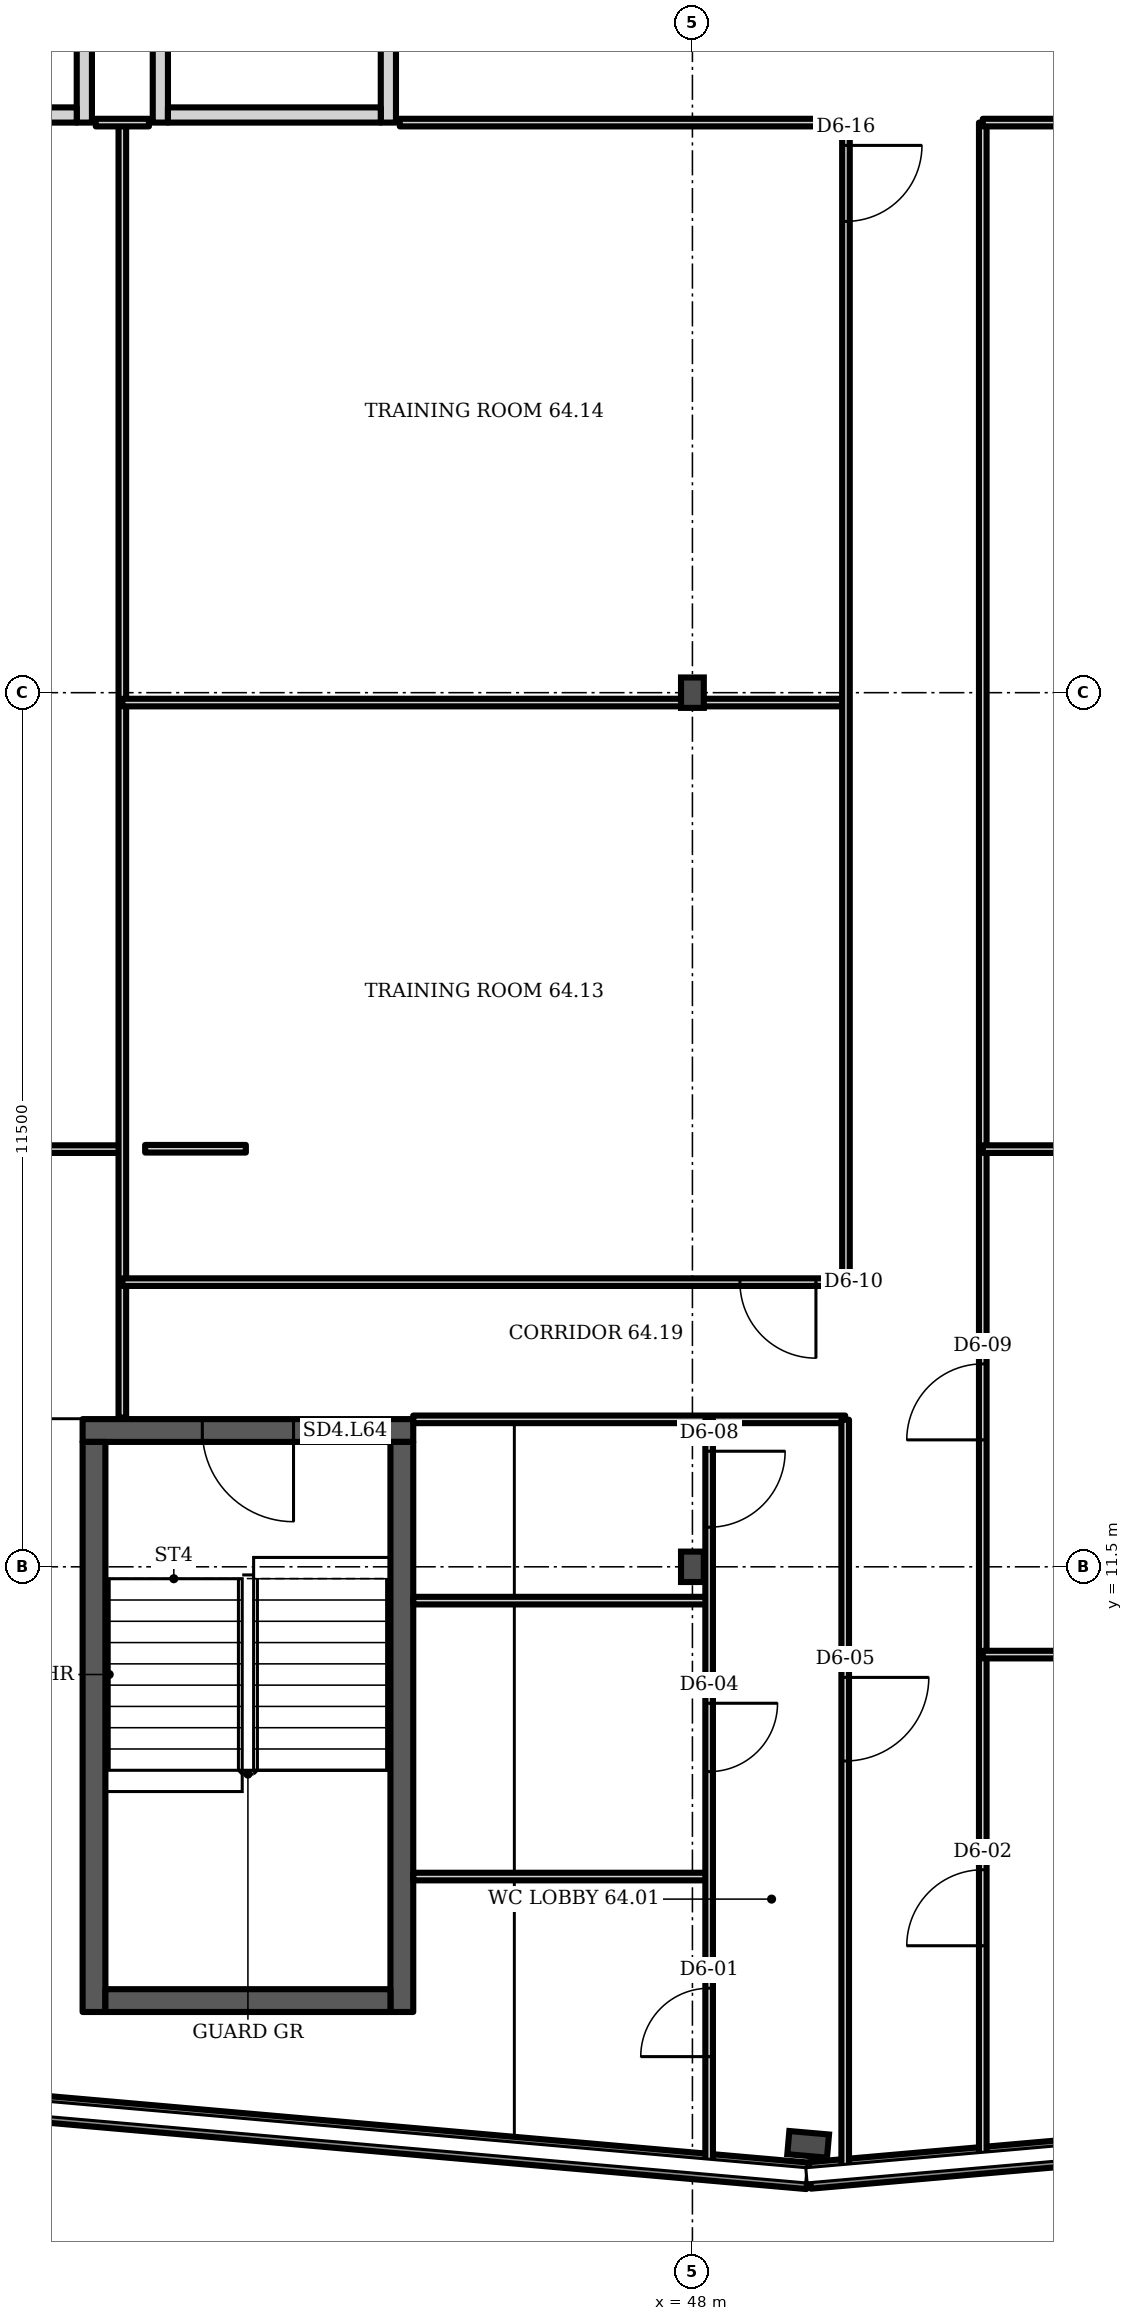
"""IFC4 building model, lengths in metres.
Left out: names, types, materials, properties, quantities, classifications, styles, units other than length and angle.
Written with IfcOpenShell. Run it as: python <this file> out.ifc"""

import sys

from ifc_helpers import new_model, si_unit, direction, frame, frame_2d, origin, origin_2d, place, context, subcontext, project, spatial, rectangle, i_section, extrude, element, fill, save


model = new_model("IFC4")
c1 = context("Model", 3, precision=1e-05, world=origin(), true_north=direction((0.0, 1.0)))
c2 = subcontext(c1, "Body", "Model", "MODEL_VIEW")
j1 = project(units=[si_unit("LENGTHUNIT", "METRE"), si_unit("PLANEANGLEUNIT", "RADIAN")], contexts=[c1])
p1 = place(None, origin())
s1 = spatial("IfcSite", under=j1, at=p1, CompositionType="ELEMENT")
p2 = place(p1, origin())
s2 = spatial("IfcBuilding", under=s1, at=p2, CompositionType="ELEMENT")
p3 = place(p2, frame((0.0, 0.0, 253.9)))
s3 = spatial("IfcBuildingStorey", under=s2, at=p3, CompositionType="ELEMENT", Elevation=253.9)
p4 = place(p3, frame((49.523, 3.902, 0.0), z_axis=(0.0, 0.0, 1.0), x_axis=(-0.087156, -0.996197, 0.0)))
e1 = element("IfcColumn", 1, at=p4, inside=s3, PredefinedType="COLUMN", context=c2, shape_type="SweptSolid", body=[
    extrude(i_section(OverallWidth=0.306, OverallDepth=0.524, WebThickness=0.021, FlangeThickness=0.04, FilletRadius=0.027, at=origin_2d()), origin(), (0.0, 0.0, 1.0), 3.6),
])
for number, where, z_axis, x_axis in (
    (2, (48.0, 11.5, 0.0), (0.0, 0.0, 1.0), (1.0, 0.0, 0.0)),
    (3, (48.0, 23.0, 0.0), (0.0, 0.0, 1.0), (1.0, 0.0, 0.0)),
):
    element("IfcColumn", number, at=place(p3, frame(where, z_axis=z_axis, x_axis=x_axis)), inside=s3, PredefinedType="COLUMN", context=c2, shape_type="SweptSolid", body=[
        extrude(i_section(OverallWidth=0.3, OverallDepth=0.4, WebThickness=0.013, FlangeThickness=0.024, FilletRadius=0.027, at=origin_2d()), origin(), (0.0, 0.0, 1.0), 3.6),
    ])
p5 = place(p3, frame((37.729, 4.519, 0.0), z_axis=(0.0, 0.0, 1.0), x_axis=(0.99619, -0.087167, 0.0)))
e4 = element("IfcWall", 4, at=p5, inside=s3, PredefinedType="SOLIDWALL", context=c2, shape_type="SweptSolid", body=[
    extrude(rectangle(XDim=11.831, YDim=0.35, at=frame_2d((5.915, 0.0))), origin(), (0.0, 0.0, 1.0), 1.0),
])
p6 = place(p3, frame((49.545, 3.493, 0.0), z_axis=(0.0, 0.0, 1.0), x_axis=(0.996196, 0.087141, 0.0)))
e5 = element("IfcWall", 5, at=p6, inside=s3, PredefinedType="SOLIDWALL", context=c2, shape_type="SweptSolid", body=[
    extrude(rectangle(XDim=11.803, YDim=0.35, at=frame_2d((5.902, 0.0))), origin(), (0.0, 0.0, 1.0), 1.0),
])
p7 = place(p3, frame((40.0, 30.5, 0.0), z_axis=(0.0, 0.0, 1.0), x_axis=(0.0, 1.0, 0.0)))
e6 = element("IfcWall", 6, at=p7, inside=s3, PredefinedType="PARTITIONING", context=c2, shape_type="SweptSolid", body=[
    extrude(rectangle(XDim=3.5, YDim=0.2, at=frame_2d((1.75, 0.0))), origin(), (0.0, 0.0, 1.0), 3.2),
])
p8 = place(p3, frame((37.1, 30.6, 0.0), z_axis=(0.0, 0.0, 1.0), x_axis=(1.0, 0.0, 0.0)))
e7 = element("IfcWall", 7, at=p8, inside=s3, PredefinedType="PARTITIONING", context=c2, shape_type="SweptSolid", body=[
    extrude(rectangle(XDim=2.8, YDim=0.2, at=frame_2d((1.4, 0.0))), origin(), (0.0, 0.0, 1.0), 3.2),
])
p9 = place(p3, frame((41.0, 30.5, 0.0), z_axis=(0.0, 0.0, 1.0), x_axis=(0.0, 1.0, 0.0)))
e8 = element("IfcWall", 8, at=p9, inside=s3, PredefinedType="PARTITIONING", context=c2, shape_type="SweptSolid", body=[
    extrude(rectangle(XDim=3.5, YDim=0.2, at=frame_2d((1.75, 0.0))), origin(), (0.0, 0.0, 1.0), 3.2),
])
p10 = place(p3, frame((44.0, 30.5, 0.0), z_axis=(0.0, 0.0, 1.0), x_axis=(0.0, 1.0, 0.0)))
e9 = element("IfcWall", 9, at=p10, inside=s3, PredefinedType="PARTITIONING", context=c2, shape_type="SweptSolid", body=[
    extrude(rectangle(XDim=3.5, YDim=0.2, at=frame_2d((1.75, 0.0))), origin(), (0.0, 0.0, 1.0), 3.2),
])
p11 = place(p10, frame((1.2, 0.0, 0.0)))
e10 = element("IfcOpeningElement", 10, at=p11, cuts=e9, PredefinedType="OPENING", context=c2, shape_type="SweptSolid", body=[
    extrude(rectangle(XDim=1.1, YDim=2.1, at=frame_2d((0.55, 1.05))), frame((0.0, 0.11, 0.0), z_axis=(0.0, -1.0, 0.0), x_axis=(1.0, 0.0, 0.0)), (0.0, 0.0, 1.0), 0.22),
])
p12 = place(p3, frame((41.1, 30.6, 0.0), z_axis=(0.0, 0.0, 1.0), x_axis=(1.0, 0.0, 0.0)))
e11 = element("IfcWall", 11, at=p12, inside=s3, PredefinedType="PARTITIONING", context=c2, shape_type="SweptSolid", body=[
    extrude(rectangle(XDim=2.8, YDim=0.2, at=frame_2d((1.4, 0.0))), origin(), (0.0, 0.0, 1.0), 3.2),
])
p13 = place(p3, frame((39.977, 13.293, 0.0), z_axis=(0.0, 0.0, 1.0), x_axis=(1.0, 0.0, 0.0)))
e12 = element("IfcWall", 12, at=p13, inside=s3, PredefinedType="SHEAR", context=c2, shape_type="SweptSolid", body=[
    extrude(rectangle(XDim=4.35, YDim=0.3, at=frame_2d((2.175, 0.0))), origin(), (0.0, 0.0, 1.0), 3.2),
])
p14 = place(p13, frame((1.575, 0.0, 0.0)))
e13 = element("IfcOpeningElement", 13, at=p14, cuts=e12, PredefinedType="OPENING", context=c2, shape_type="SweptSolid", body=[
    extrude(rectangle(XDim=1.2, YDim=2.1, at=frame_2d((0.6, 1.05))), frame((0.0, 0.16, 0.0), z_axis=(0.0, -1.0, 0.0), x_axis=(1.0, 0.0, 0.0)), (0.0, 0.0, 1.0), 0.32),
])
p15 = place(p3, frame((29.1, 16.995, 0.0), z_axis=(0.0, 0.0, 1.0), x_axis=(1.0, 0.0, 0.0)))
e14 = element("IfcWall", 14, at=p15, inside=s3, PredefinedType="PARTITIONING", context=c2, shape_type="SweptSolid", body=[
    extrude(rectangle(XDim=11.4, YDim=0.1, at=frame_2d((5.7, 0.0))), origin(), (0.0, 0.0, 1.0), 3.2),
])
p16 = place(p3, frame((40.5, 13.463, 0.0), z_axis=(0.0, 0.0, 1.0), x_axis=(0.0, 1.0, 0.0)))
e15 = element("IfcWall", 15, at=p16, inside=s3, PredefinedType="PARTITIONING", context=c2, shape_type="SweptSolid", body=[
    extrude(rectangle(XDim=17.037, YDim=0.1, at=frame_2d((8.519, 0.0))), origin(), (0.0, 0.0, 1.0), 3.2),
])
p17 = place(p3, frame((40.5, 15.245, 0.0), z_axis=(0.0, 0.0, 1.0), x_axis=(1.0, 0.0, 0.0)))
e16 = element("IfcWall", 16, at=p17, inside=s3, PredefinedType="PARTITIONING", context=c2, shape_type="SweptSolid", body=[
    extrude(rectangle(XDim=9.52, YDim=0.1, at=frame_2d((4.76, 0.0))), origin(), (0.0, 0.0, 1.0), 3.2),
])
p18 = place(p17, frame((8.125, 0.0, 0.0)))
e17 = element("IfcOpeningElement", 17, at=p18, cuts=e16, PredefinedType="OPENING", context=c2, shape_type="SweptSolid", body=[
    extrude(rectangle(XDim=1.0, YDim=2.1, at=frame_2d((0.5, 1.05))), frame((0.0, 0.06, 0.0), z_axis=(0.0, -1.0, 0.0), x_axis=(1.0, 0.0, 0.0)), (0.0, 0.0, 1.0), 0.12),
])
p19 = place(p3, frame((40.5, 22.87, 0.0), z_axis=(0.0, 0.0, 1.0), x_axis=(1.0, 0.0, 0.0)))
e18 = element("IfcWall", 18, at=p19, inside=s3, PredefinedType="PARTITIONING", context=c2, shape_type="SweptSolid", body=[
    extrude(rectangle(XDim=9.52, YDim=0.1, at=frame_2d((4.76, 0.0))), origin(), (0.0, 0.0, 1.0), 3.2),
])
p20 = place(p3, frame((40.8, 17.0, 0.0), z_axis=(0.0, 0.0, 1.0), x_axis=(1.0, 0.0, 0.0)))
e19 = element("IfcWall", 19, at=p20, inside=s3, PredefinedType="PARTITIONING", context=c2, shape_type="SweptSolid", body=[
    extrude(rectangle(XDim=1.325, YDim=0.1, at=frame_2d((0.663, 0.0))), origin(), (0.0, 0.0, 1.0), 3.2),
])
for number, where, z_axis, x_axis in (
    (20, (44.327, 7.425, 0.0), (0.0, 0.0, 1.0), (1.0, 0.0, 0.0)),
    (21, (44.327, 11.055, 0.0), (0.0, 0.0, 1.0), (1.0, 0.0, 0.0)),
):
    element("IfcWall", number, at=place(p3, frame(where, z_axis=z_axis, x_axis=x_axis)), inside=s3, PredefinedType="PARTITIONING", context=c2, shape_type="SweptSolid", body=[
        extrude(rectangle(XDim=3.893, YDim=0.1, at=frame_2d((1.946, 0.0))), origin(), (0.0, 0.0, 1.0), 3.2),
    ])
p21 = place(p3, frame((44.327, 13.44, 0.0), z_axis=(0.0, 0.0, 1.0), x_axis=(1.0, 0.0, 0.0)))
e22 = element("IfcWall", 22, at=p21, inside=s3, PredefinedType="PARTITIONING", context=c2, shape_type="SweptSolid", body=[
    extrude(rectangle(XDim=5.683, YDim=0.1, at=frame_2d((2.841, 0.0))), origin(), (0.0, 0.0, 1.0), 3.2),
])
p22 = place(p3, frame((48.22, 3.626, 0.0), z_axis=(0.0, 0.0, 1.0), x_axis=(0.0, 1.0, 0.0)))
e23 = element("IfcWall", 23, at=p22, inside=s3, PredefinedType="PARTITIONING", context=c2, shape_type="SweptSolid", body=[
    extrude(rectangle(XDim=9.809, YDim=0.1, at=frame_2d((4.904, 0.0))), origin(), (0.0, 0.0, 1.0), 2.58),
])
p23 = place(p22, frame((1.43, 0.0, 0.0)))
e24 = element("IfcOpeningElement", 24, at=p23, cuts=e23, PredefinedType="OPENING", context=c2, shape_type="SweptSolid", body=[
    extrude(rectangle(XDim=0.9, YDim=2.1, at=frame_2d((0.45, 1.05))), frame((0.0, 0.06, 0.0), z_axis=(0.0, -1.0, 0.0), x_axis=(1.0, 0.0, 0.0)), (0.0, 0.0, 1.0), 0.12),
])
p24 = place(p22, frame((5.179, 0.0, 0.0)))
e25 = element("IfcOpeningElement", 25, at=p24, cuts=e23, PredefinedType="OPENING", context=c2, shape_type="SweptSolid", body=[
    extrude(rectangle(XDim=0.9, YDim=2.1, at=frame_2d((0.45, 1.05))), frame((0.0, 0.06, 0.0), z_axis=(0.0, -1.0, 0.0), x_axis=(1.0, 0.0, 0.0)), (0.0, 0.0, 1.0), 0.12),
])
p25 = place(p22, frame((8.395, 0.0, 0.0)))
e26 = element("IfcOpeningElement", 26, at=p25, cuts=e23, PredefinedType="OPENING", context=c2, shape_type="SweptSolid", body=[
    extrude(rectangle(XDim=1.0, YDim=2.1, at=frame_2d((0.5, 1.05))), frame((0.0, 0.06, 0.0), z_axis=(0.0, -1.0, 0.0), x_axis=(1.0, 0.0, 0.0)), (0.0, 0.0, 1.0), 0.12),
])
p26 = place(p3, frame((50.01, 3.559, 0.0), z_axis=(0.0, 0.0, 1.0), x_axis=(0.0, 1.0, 0.0)))
e27 = element("IfcWall", 27, at=p26, inside=s3, PredefinedType="PARTITIONING", context=c2, shape_type="SweptSolid", body=[
    extrude(rectangle(XDim=9.876, YDim=0.1, at=frame_2d((4.938, 0.0))), origin(), (0.0, 0.0, 1.0), 2.58),
])
p27 = place(p26, frame((5.386, 0.0, 0.0)))
e28 = element("IfcOpeningElement", 28, at=p27, cuts=e27, PredefinedType="OPENING", context=c2, shape_type="SweptSolid", body=[
    extrude(rectangle(XDim=1.1, YDim=2.1, at=frame_2d((0.55, 1.05))), frame((0.0, 0.06, 0.0), z_axis=(0.0, -1.0, 0.0), x_axis=(1.0, 0.0, 0.0)), (0.0, 0.0, 1.0), 0.12),
])
p28 = place(p3, frame((50.02, 15.245, 0.0), z_axis=(0.0, 0.0, 1.0), x_axis=(0.0, 1.0, 0.0)))
e29 = element("IfcWall", 29, at=p28, inside=s3, PredefinedType="PARTITIONING", context=c2, shape_type="SweptSolid", body=[
    extrude(rectangle(XDim=15.255, YDim=0.1, at=frame_2d((7.627, 0.0))), origin(), (0.0, 0.0, 1.0), 3.2),
])
p29 = place(p28, frame((13.955, 0.0, 0.0)))
e30 = element("IfcOpeningElement", 30, at=p29, cuts=e29, PredefinedType="OPENING", context=c2, shape_type="SweptSolid", body=[
    extrude(rectangle(XDim=1.0, YDim=2.1, at=frame_2d((0.5, 1.05))), frame((0.0, 0.06, 0.0), z_axis=(0.0, -1.0, 0.0), x_axis=(1.0, 0.0, 0.0)), (0.0, 0.0, 1.0), 0.12),
])
p30 = place(p3, frame((51.82, 3.717, 0.0), z_axis=(0.0, 0.0, 1.0), x_axis=(0.0, 1.0, 0.0)))
e31 = element("IfcWall", 31, at=p30, inside=s3, PredefinedType="PARTITIONING", context=c2, shape_type="SweptSolid", body=[
    extrude(rectangle(XDim=26.783, YDim=0.1, at=frame_2d((13.391, 0.0))), origin(), (0.0, 0.0, 1.0), 2.58),
])
p31 = place(p30, frame((2.798, 0.0, 0.0)))
e32 = element("IfcOpeningElement", 32, at=p31, cuts=e31, PredefinedType="OPENING", context=c2, shape_type="SweptSolid", body=[
    extrude(rectangle(XDim=1.0, YDim=2.1, at=frame_2d((0.5, 1.05))), frame((0.0, 0.06, 0.0), z_axis=(0.0, -1.0, 0.0), x_axis=(1.0, 0.0, 0.0)), (0.0, 0.0, 1.0), 0.12),
])
p32 = place(p30, frame((9.453, 0.0, 0.0)))
e33 = element("IfcOpeningElement", 33, at=p32, cuts=e31, PredefinedType="OPENING", context=c2, shape_type="SweptSolid", body=[
    extrude(rectangle(XDim=1.0, YDim=2.1, at=frame_2d((0.5, 1.05))), frame((0.0, 0.06, 0.0), z_axis=(0.0, -1.0, 0.0), x_axis=(1.0, 0.0, 0.0)), (0.0, 0.0, 1.0), 0.12),
])
p33 = place(p3, frame((51.82, 10.345, 0.0), z_axis=(0.0, 0.0, 1.0), x_axis=(1.0, 0.0, 0.0)))
e34 = element("IfcWall", 34, at=p33, inside=s3, PredefinedType="PARTITIONING", context=c2, shape_type="SweptSolid", body=[
    extrude(rectangle(XDim=6.305, YDim=0.1, at=frame_2d((3.152, 0.0))), origin(), (0.0, 0.0, 1.0), 3.2),
])
p34 = place(p3, frame((51.82, 16.995, 0.0), z_axis=(0.0, 0.0, 1.0), x_axis=(1.0, 0.0, 0.0)))
e35 = element("IfcWall", 35, at=p34, inside=s3, PredefinedType="PARTITIONING", context=c2, shape_type="SweptSolid", body=[
    extrude(rectangle(XDim=13.1, YDim=0.1, at=frame_2d((6.55, 0.0))), origin(), (0.0, 0.0, 1.0), 3.2),
])
p35 = place(p3, frame((51.82, 30.5, 0.0), z_axis=(0.0, 0.0, 1.0), x_axis=(1.0, 0.0, 0.0)))
e36 = element("IfcWall", 36, at=p35, inside=s3, PredefinedType="PARTITIONING", context=c2, shape_type="SweptSolid", body=[
    extrude(rectangle(XDim=6.18, YDim=0.1, at=frame_2d((3.09, 0.0))), origin(), (0.0, 0.0, 1.0), 3.2),
])
p36 = place(p3, frame((40.15, 30.5, 0.0), z_axis=(0.0, 0.0, 1.0), x_axis=(1.0, 0.0, 0.0)))
e37 = element("IfcWall", 37, at=p36, inside=s3, PredefinedType="PARTITIONING", context=c2, shape_type="SweptSolid", body=[
    extrude(rectangle(XDim=0.7, YDim=0.1, at=frame_2d((0.35, 0.0))), origin(), (0.0, 0.0, 1.0), 3.2),
])
p37 = place(p3, frame((44.15, 30.5, 0.0), z_axis=(0.0, 0.0, 1.0), x_axis=(1.0, 0.0, 0.0)))
e38 = element("IfcWall", 38, at=p37, inside=s3, PredefinedType="PARTITIONING", context=c2, shape_type="SweptSolid", body=[
    extrude(rectangle(XDim=5.87, YDim=0.1, at=frame_2d((2.935, 0.0))), origin(), (0.0, 0.0, 1.0), 3.2),
])
for number, where, z_axis, x_axis in (
    (39, (40.127, 5.643, 0.0), (0.0, 0.0, 1.0), (0.0, 1.0, 0.0)),
    (40, (44.177, 5.643, 0.0), (0.0, 0.0, 1.0), (0.0, 1.0, 0.0)),
):
    element("IfcWall", number, at=place(p3, frame(where, z_axis=z_axis, x_axis=x_axis)), inside=s3, PredefinedType="SHEAR", context=c2, shape_type="SweptSolid", body=[
        extrude(rectangle(XDim=7.5, YDim=0.3, at=frame_2d((3.75, 0.0))), origin(), (0.0, 0.0, 1.0), 3.2),
    ])
p38 = place(p3, frame((40.277, 5.793, 0.0), z_axis=(0.0, 0.0, 1.0), x_axis=(1.0, 0.0, 0.0)))
e41 = element("IfcWall", 41, at=p38, inside=s3, PredefinedType="SHEAR", context=c2, shape_type="SweptSolid", body=[
    extrude(rectangle(XDim=3.75, YDim=0.3, at=frame_2d((1.875, 0.0))), origin(), (0.0, 0.0, 1.0), 3.2),
])
p39 = place(p14, origin())
e42 = element("IfcDoor", 42, at=p39, inside=s3, OperationType="SINGLE_SWING_RIGHT", PredefinedType="DOOR", context=c2, shape_type="SweptSolid", body=[
    extrude(rectangle(XDim=1.2, YDim=2.1, at=frame_2d((0.6, 1.05))), frame((0.0, 0.025, 0.0), z_axis=(0.0, -1.0, 0.0), x_axis=(1.0, 0.0, 0.0)), (0.0, 0.0, 1.0), 0.05),
])
fill(e13, e42)
p40 = place(p23, origin())
e43 = element("IfcDoor", 43, at=p40, inside=s3, OperationType="SINGLE_SWING_LEFT", PredefinedType="DOOR", context=c2, shape_type="SweptSolid", body=[
    extrude(rectangle(XDim=0.9, YDim=2.1, at=frame_2d((0.45, 1.05))), frame((0.0, 0.025, 0.0), z_axis=(0.0, -1.0, 0.0), x_axis=(1.0, 0.0, 0.0)), (0.0, 0.0, 1.0), 0.05),
])
fill(e24, e43)
p41 = place(p31, origin())
e44 = element("IfcDoor", 44, at=p41, inside=s3, OperationType="SINGLE_SWING_LEFT", PredefinedType="DOOR", context=c2, shape_type="SweptSolid", body=[
    extrude(rectangle(XDim=1.0, YDim=2.1, at=frame_2d((0.5, 1.05))), frame((0.0, 0.025, 0.0), z_axis=(0.0, -1.0, 0.0), x_axis=(1.0, 0.0, 0.0)), (0.0, 0.0, 1.0), 0.05),
])
fill(e32, e44)
p42 = place(p24, origin())
e45 = element("IfcDoor", 45, at=p42, inside=s3, OperationType="SINGLE_SWING_RIGHT", PredefinedType="DOOR", context=c2, shape_type="SweptSolid", body=[
    extrude(rectangle(XDim=0.9, YDim=2.1, at=frame_2d((0.45, 1.05))), frame((0.0, 0.025, 0.0), z_axis=(0.0, -1.0, 0.0), x_axis=(1.0, 0.0, 0.0)), (0.0, 0.0, 1.0), 0.05),
])
fill(e25, e45)
p43 = place(p27, origin())
e46 = element("IfcDoor", 46, at=p43, inside=s3, OperationType="SINGLE_SWING_RIGHT", PredefinedType="DOOR", context=c2, shape_type="SweptSolid", body=[
    extrude(rectangle(XDim=1.1, YDim=2.1, at=frame_2d((0.55, 1.05))), frame((0.0, 0.025, 0.0), z_axis=(0.0, -1.0, 0.0), x_axis=(1.0, 0.0, 0.0)), (0.0, 0.0, 1.0), 0.05),
])
fill(e28, e46)
p44 = place(p25, origin())
e47 = element("IfcDoor", 47, at=p44, inside=s3, OperationType="SINGLE_SWING_RIGHT", PredefinedType="DOOR", context=c2, shape_type="SweptSolid", body=[
    extrude(rectangle(XDim=1.0, YDim=2.1, at=frame_2d((0.5, 1.05))), frame((0.0, 0.025, 0.0), z_axis=(0.0, -1.0, 0.0), x_axis=(1.0, 0.0, 0.0)), (0.0, 0.0, 1.0), 0.05),
])
fill(e26, e47)
p45 = place(p32, origin())
e48 = element("IfcDoor", 48, at=p45, inside=s3, OperationType="SINGLE_SWING_LEFT", PredefinedType="DOOR", context=c2, shape_type="SweptSolid", body=[
    extrude(rectangle(XDim=1.0, YDim=2.1, at=frame_2d((0.5, 1.05))), frame((0.0, 0.025, 0.0), z_axis=(0.0, -1.0, 0.0), x_axis=(1.0, 0.0, 0.0)), (0.0, 0.0, 1.0), 0.05),
])
fill(e33, e48)
p46 = place(p18, origin())
e49 = element("IfcDoor", 49, at=p46, inside=s3, OperationType="SINGLE_SWING_RIGHT", PredefinedType="DOOR", context=c2, shape_type="SweptSolid", body=[
    extrude(rectangle(XDim=1.0, YDim=2.1, at=frame_2d((0.5, 1.05))), frame((0.0, 0.025, 0.0), z_axis=(0.0, -1.0, 0.0), x_axis=(1.0, 0.0, 0.0)), (0.0, 0.0, 1.0), 0.05),
])
fill(e17, e49)
p47 = place(p29, origin())
e50 = element("IfcDoor", 50, at=p47, inside=s3, OperationType="SINGLE_SWING_RIGHT", PredefinedType="DOOR", context=c2, shape_type="SweptSolid", body=[
    extrude(rectangle(XDim=1.0, YDim=2.1, at=frame_2d((0.5, 1.05))), frame((0.0, 0.025, 0.0), z_axis=(0.0, -1.0, 0.0), x_axis=(1.0, 0.0, 0.0)), (0.0, 0.0, 1.0), 0.05),
])
fill(e30, e50)
save(model, sys.argv[1])
